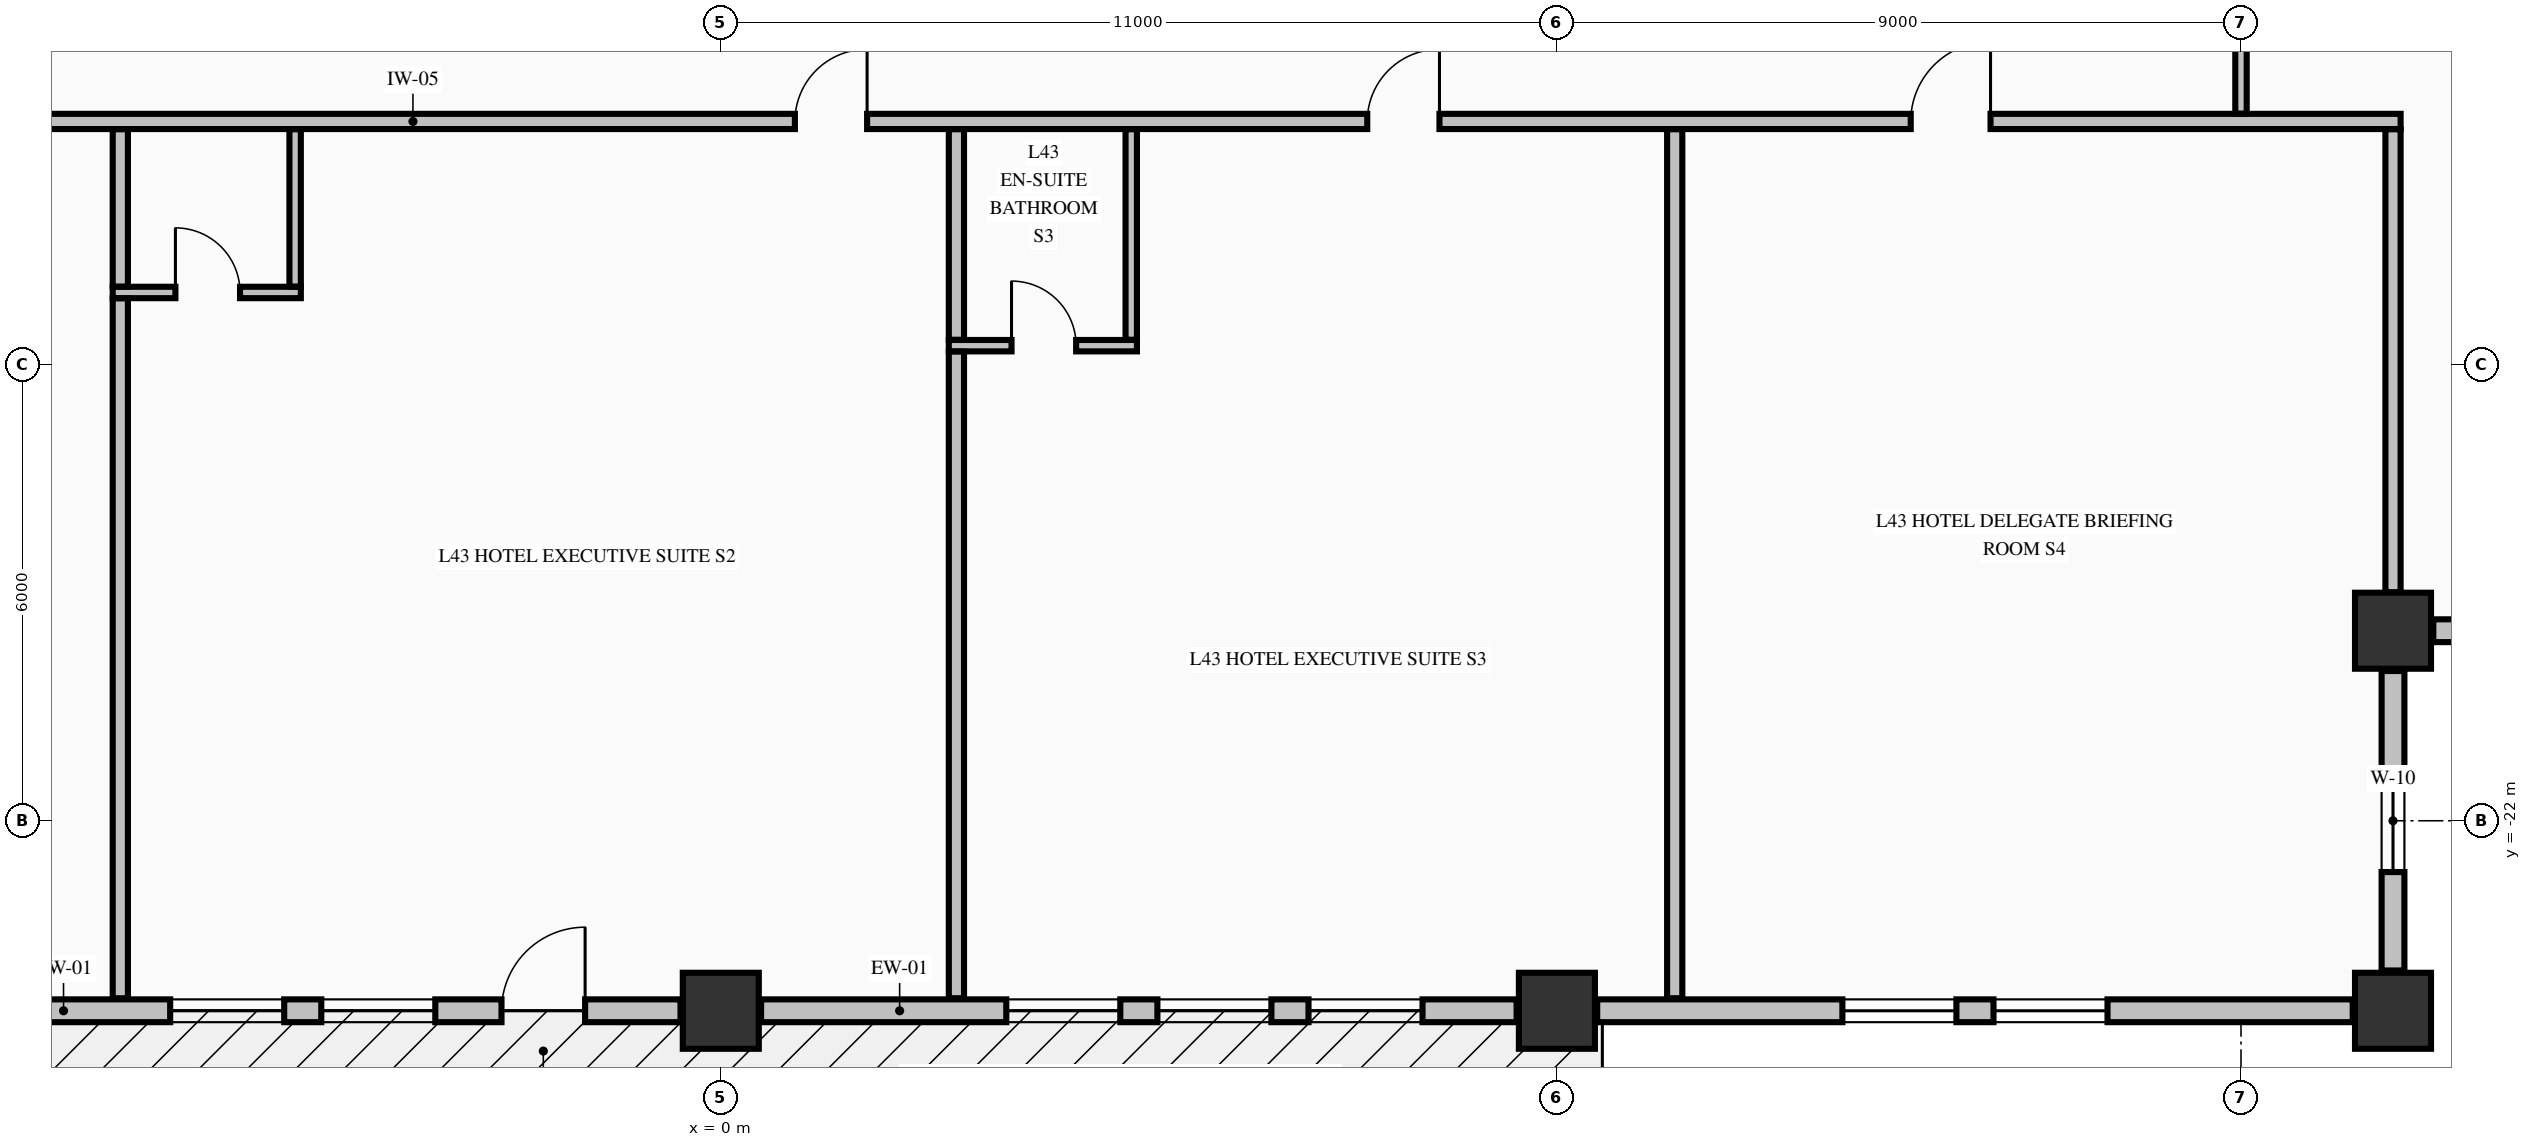
"""IFC4 building model, lengths in metres.
Left out: names, types, materials, properties, quantities, classifications, styles, units other than length and angle.
Written with IfcOpenShell. Run it as: python <this file> out.ifc"""

import sys

from ifc_helpers import new_model, si_unit, direction, frame, frame_2d, origin, origin_2d, place, context, subcontext, project, spatial, rectangle, extrude, element, fill, save


model = new_model("IFC4")
c1 = context("Model", 3, precision=1e-05, world=origin(), true_north=direction((0.0, 1.0)))
c2 = subcontext(c1, "Body", "Model", "MODEL_VIEW")
j1 = project(units=[si_unit("LENGTHUNIT", "METRE"), si_unit("PLANEANGLEUNIT", "RADIAN")], contexts=[c1])
p1 = place(None, origin())
s1 = spatial("IfcSite", under=j1, at=p1, CompositionType="ELEMENT")
p2 = place(p1, origin())
s2 = spatial("IfcBuilding", under=s1, at=p2, CompositionType="ELEMENT")
p3 = place(p2, frame((0.0, 0.0, 169.46)))
s3 = spatial("IfcBuildingStorey", under=s2, at=p3, CompositionType="ELEMENT", Elevation=169.46)
for number, where, z_axis, x_axis in (
    (1, (0.0, -24.5, -0.25), (0.0, 0.0, 1.0), (1.0, 0.0, 0.0)),
    (2, (11.0, -24.5, -0.25), (0.0, 0.0, 1.0), (1.0, 0.0, 0.0)),
    (3, (22.0, -24.5, -0.25), (0.0, 0.0, 1.0), (1.0, 0.0, 0.0)),
    (4, (22.0, -19.5, -0.25), (0.0, 0.0, 1.0), (1.0, 0.0, 0.0)),
):
    element("IfcColumn", number, at=place(p3, frame(where, z_axis=z_axis, x_axis=x_axis)), inside=s3, PredefinedType="COLUMN", context=c2, shape_type="SweptSolid", body=[
        extrude(rectangle(XDim=1.0, YDim=1.0, at=origin_2d()), origin(), (0.0, 0.0, 1.0), 3.4),
    ])
p4 = place(p3, frame((22.0, -23.97, 0.0), z_axis=(0.0, 0.0, 1.0), x_axis=(0.0, 1.0, 0.0)))
e5 = element("IfcWall", 5, at=p4, inside=s3, PredefinedType="STANDARD", context=c2, shape_type="SweptSolid", body=[
    extrude(rectangle(XDim=3.94, YDim=0.3, at=frame_2d((1.97, 0.0))), origin(), (0.0, 0.0, 1.0), 2.542),
])
p5 = place(p4, frame((1.295, 0.0, 0.68)))
e6 = element("IfcOpeningElement", 6, at=p5, cuts=e5, PredefinedType="OPENING", context=c2, shape_type="SweptSolid", body=[
    extrude(rectangle(XDim=1.35, YDim=1.42, at=frame_2d((0.675, 0.71))), frame((0.0, 0.16, 0.0), z_axis=(0.0, -1.0, 0.0), x_axis=(1.0, 0.0, 0.0)), (0.0, 0.0, 1.0), 0.32),
])
p6 = place(p3, frame((22.53, -19.5, 0.0), z_axis=(0.0, 0.0, 1.0), x_axis=(1.0, 0.0, 0.0)))
e7 = element("IfcWall", 7, at=p6, inside=s3, PredefinedType="STANDARD", context=c2, shape_type="SweptSolid", body=[
    extrude(rectangle(XDim=3.94, YDim=0.3, at=frame_2d((1.97, 0.0))), origin(), (0.0, 0.0, 1.0), 2.542),
])
p7 = place(p6, frame((1.295, 0.0, 0.68)))
e8 = element("IfcOpeningElement", 8, at=p7, cuts=e7, PredefinedType="OPENING", context=c2, shape_type="SweptSolid", body=[
    extrude(rectangle(XDim=1.35, YDim=1.42, at=frame_2d((0.675, 0.71))), frame((0.0, 0.16, 0.0), z_axis=(0.0, -1.0, 0.0), x_axis=(1.0, 0.0, 0.0)), (0.0, 0.0, 1.0), 0.32),
])
p8 = place(p3, frame((-10.47, -24.5, 0.0), z_axis=(0.0, 0.0, 1.0), x_axis=(1.0, 0.0, 0.0)))
e9 = element("IfcWall", 9, at=p8, inside=s3, PredefinedType="STANDARD", context=c2, shape_type="SweptSolid", body=[
    extrude(rectangle(XDim=9.94, YDim=0.3, at=frame_2d((4.97, 0.0))), origin(), (0.0, 0.0, 1.0), 2.542),
])
p9 = place(p8, frame((7.585, 0.0, 0.0)))
e10 = element("IfcOpeningElement", 10, at=p9, cuts=e9, PredefinedType="OPENING", context=c2, shape_type="SweptSolid", body=[
    extrude(rectangle(XDim=1.1, YDim=2.15, at=frame_2d((0.55, 1.075))), frame((0.0, 0.16, 0.0), z_axis=(0.0, -1.0, 0.0), x_axis=(1.0, 0.0, 0.0)), (0.0, 0.0, 1.0), 0.32),
])
p10 = place(p8, frame((3.226, 0.0, 0.72)))
e11 = element("IfcOpeningElement", 11, at=p10, cuts=e9, PredefinedType="OPENING", context=c2, shape_type="SweptSolid", body=[
    extrude(rectangle(XDim=1.5, YDim=1.6, at=frame_2d((0.75, 0.8))), frame((0.0, 0.16, 0.0), z_axis=(0.0, -1.0, 0.0), x_axis=(1.0, 0.0, 0.0)), (0.0, 0.0, 1.0), 0.32),
])
p11 = place(p8, frame((5.214, 0.0, 0.72)))
e12 = element("IfcOpeningElement", 12, at=p11, cuts=e9, PredefinedType="OPENING", context=c2, shape_type="SweptSolid", body=[
    extrude(rectangle(XDim=1.5, YDim=1.6, at=frame_2d((0.75, 0.8))), frame((0.0, 0.16, 0.0), z_axis=(0.0, -1.0, 0.0), x_axis=(1.0, 0.0, 0.0)), (0.0, 0.0, 1.0), 0.32),
])
p12 = place(p3, frame((0.53, -24.5, 0.0), z_axis=(0.0, 0.0, 1.0), x_axis=(1.0, 0.0, 0.0)))
e13 = element("IfcWall", 13, at=p12, inside=s3, PredefinedType="STANDARD", context=c2, shape_type="SweptSolid", body=[
    extrude(rectangle(XDim=9.94, YDim=0.3, at=frame_2d((4.97, 0.0))), origin(), (0.0, 0.0, 1.0), 2.542),
])
p13 = place(p12, frame((3.226, 0.0, 0.72)))
e14 = element("IfcOpeningElement", 14, at=p13, cuts=e13, PredefinedType="OPENING", context=c2, shape_type="SweptSolid", body=[
    extrude(rectangle(XDim=1.5, YDim=1.6, at=frame_2d((0.75, 0.8))), frame((0.0, 0.16, 0.0), z_axis=(0.0, -1.0, 0.0), x_axis=(1.0, 0.0, 0.0)), (0.0, 0.0, 1.0), 0.32),
])
p14 = place(p12, frame((5.214, 0.0, 0.72)))
e15 = element("IfcOpeningElement", 15, at=p14, cuts=e13, PredefinedType="OPENING", context=c2, shape_type="SweptSolid", body=[
    extrude(rectangle(XDim=1.5, YDim=1.6, at=frame_2d((0.75, 0.8))), frame((0.0, 0.16, 0.0), z_axis=(0.0, -1.0, 0.0), x_axis=(1.0, 0.0, 0.0)), (0.0, 0.0, 1.0), 0.32),
])
p15 = place(p12, frame((7.202, 0.0, 0.72)))
e16 = element("IfcOpeningElement", 16, at=p15, cuts=e13, PredefinedType="OPENING", context=c2, shape_type="SweptSolid", body=[
    extrude(rectangle(XDim=1.5, YDim=1.6, at=frame_2d((0.75, 0.8))), frame((0.0, 0.16, 0.0), z_axis=(0.0, -1.0, 0.0), x_axis=(1.0, 0.0, 0.0)), (0.0, 0.0, 1.0), 0.32),
])
p16 = place(p3, frame((11.53, -24.5, 0.0), z_axis=(0.0, 0.0, 1.0), x_axis=(1.0, 0.0, 0.0)))
e17 = element("IfcWall", 17, at=p16, inside=s3, PredefinedType="STANDARD", context=c2, shape_type="SweptSolid", body=[
    extrude(rectangle(XDim=9.94, YDim=0.3, at=frame_2d((4.97, 0.0))), origin(), (0.0, 0.0, 1.0), 2.542),
])
p17 = place(p16, frame((3.226, 0.0, 0.72)))
e18 = element("IfcOpeningElement", 18, at=p17, cuts=e17, PredefinedType="OPENING", context=c2, shape_type="SweptSolid", body=[
    extrude(rectangle(XDim=1.5, YDim=1.6, at=frame_2d((0.75, 0.8))), frame((0.0, 0.16, 0.0), z_axis=(0.0, -1.0, 0.0), x_axis=(1.0, 0.0, 0.0)), (0.0, 0.0, 1.0), 0.32),
])
p18 = place(p16, frame((5.214, 0.0, 0.72)))
e19 = element("IfcOpeningElement", 19, at=p18, cuts=e17, PredefinedType="OPENING", context=c2, shape_type="SweptSolid", body=[
    extrude(rectangle(XDim=1.5, YDim=1.6, at=frame_2d((0.75, 0.8))), frame((0.0, 0.16, 0.0), z_axis=(0.0, -1.0, 0.0), x_axis=(1.0, 0.0, 0.0)), (0.0, 0.0, 1.0), 0.32),
])
p19 = place(p3, frame((3.0, -15.75, 0.0), z_axis=(0.0, 0.0, 1.0), x_axis=(1.0, 0.0, 0.0)))
e20 = element("IfcWall", 20, at=p19, inside=s3, PredefinedType="PARTITIONING", context=c2, shape_type="SweptSolid", body=[
    extrude(rectangle(XDim=2.475, YDim=0.15, at=frame_2d((1.238, 0.0))), origin(), (0.0, 0.0, 1.0), 3.15),
])
p20 = place(p19, frame((0.825, 0.0, 0.0)))
e21 = element("IfcOpeningElement", 21, at=p20, cuts=e20, PredefinedType="OPENING", context=c2, shape_type="SweptSolid", body=[
    extrude(rectangle(XDim=0.85, YDim=2.1, at=frame_2d((0.425, 1.05))), frame((0.0, 0.085, 0.0), z_axis=(0.0, -1.0, 0.0), x_axis=(1.0, 0.0, 0.0)), (0.0, 0.0, 1.0), 0.17),
])
p21 = place(p3, frame((-8.0, -15.05, 0.0), z_axis=(0.0, 0.0, 1.0), x_axis=(1.0, 0.0, 0.0)))
e22 = element("IfcWall", 22, at=p21, inside=s3, PredefinedType="PARTITIONING", context=c2, shape_type="SweptSolid", body=[
    extrude(rectangle(XDim=2.475, YDim=0.15, at=frame_2d((1.238, 0.0))), origin(), (0.0, 0.0, 1.0), 3.15),
])
p22 = place(p21, frame((0.825, 0.0, 0.0)))
e23 = element("IfcOpeningElement", 23, at=p22, cuts=e22, PredefinedType="OPENING", context=c2, shape_type="SweptSolid", body=[
    extrude(rectangle(XDim=0.85, YDim=2.1, at=frame_2d((0.425, 1.05))), frame((0.0, 0.085, 0.0), z_axis=(0.0, -1.0, 0.0), x_axis=(1.0, 0.0, 0.0)), (0.0, 0.0, 1.0), 0.17),
])
p23 = place(p3, frame((-17.1, -12.8, 0.0), z_axis=(0.0, 0.0, 1.0), x_axis=(1.0, 0.0, 0.0)))
e24 = element("IfcWall", 24, at=p23, inside=s3, PredefinedType="PARTITIONING", context=c2, shape_type="SweptSolid", body=[
    extrude(rectangle(XDim=39.2, YDim=0.2, at=frame_2d((19.6, 0.0))), origin(), (0.0, 0.0, 1.0), 3.15),
])
p24 = place(p23, frame((7.075, 0.0, 0.0)))
e25 = element("IfcOpeningElement", 25, at=p24, cuts=e24, PredefinedType="OPENING", context=c2, shape_type="SweptSolid", body=[
    extrude(rectangle(XDim=0.95, YDim=2.15, at=frame_2d((0.475, 1.075))), frame((0.0, 0.11, 0.0), z_axis=(0.0, -1.0, 0.0), x_axis=(1.0, 0.0, 0.0)), (0.0, 0.0, 1.0), 0.22),
])
p25 = place(p23, frame((18.075, 0.0, 0.0)))
e26 = element("IfcOpeningElement", 26, at=p25, cuts=e24, PredefinedType="OPENING", context=c2, shape_type="SweptSolid", body=[
    extrude(rectangle(XDim=0.95, YDim=2.15, at=frame_2d((0.475, 1.075))), frame((0.0, 0.11, 0.0), z_axis=(0.0, -1.0, 0.0), x_axis=(1.0, 0.0, 0.0)), (0.0, 0.0, 1.0), 0.22),
])
p26 = place(p23, frame((25.605, 0.0, 0.0)))
e27 = element("IfcOpeningElement", 27, at=p26, cuts=e24, PredefinedType="OPENING", context=c2, shape_type="SweptSolid", body=[
    extrude(rectangle(XDim=0.95, YDim=2.15, at=frame_2d((0.475, 1.075))), frame((0.0, 0.11, 0.0), z_axis=(0.0, -1.0, 0.0), x_axis=(1.0, 0.0, 0.0)), (0.0, 0.0, 1.0), 0.22),
])
p27 = place(p23, frame((32.755, 0.0, 0.0)))
e28 = element("IfcOpeningElement", 28, at=p27, cuts=e24, PredefinedType="OPENING", context=c2, shape_type="SweptSolid", body=[
    extrude(rectangle(XDim=1.05, YDim=2.15, at=frame_2d((0.525, 1.075))), frame((0.0, 0.11, 0.0), z_axis=(0.0, -1.0, 0.0), x_axis=(1.0, 0.0, 0.0)), (0.0, 0.0, 1.0), 0.22),
])
p28 = place(p3, frame((-7.9, -24.335, 0.0), z_axis=(0.0, 0.0, 1.0), x_axis=(0.0, 1.0, 0.0)))
e29 = element("IfcWall", 29, at=p28, inside=s3, PredefinedType="PARTITIONING", context=c2, shape_type="SweptSolid", body=[
    extrude(rectangle(XDim=9.207, YDim=0.2, at=frame_2d((4.604, 0.0))), origin(), (0.0, 0.0, 1.0), 3.15),
])
p29 = place(p3, frame((-7.9, -14.972, 0.0), z_axis=(0.0, 0.0, 1.0), x_axis=(0.0, 1.0, 0.0)))
e30 = element("IfcWall", 30, at=p29, inside=s3, PredefinedType="PARTITIONING", context=c2, shape_type="SweptSolid", body=[
    extrude(rectangle(XDim=2.069, YDim=0.2, at=frame_2d((1.034, 0.0))), origin(), (0.0, 0.0, 1.0), 3.15),
])
p30 = place(p3, frame((-5.6, -14.972, 0.0), z_axis=(0.0, 0.0, 1.0), x_axis=(0.0, 1.0, 0.0)))
e31 = element("IfcWall", 31, at=p30, inside=s3, PredefinedType="PARTITIONING", context=c2, shape_type="SweptSolid", body=[
    extrude(rectangle(XDim=2.069, YDim=0.15, at=frame_2d((1.034, 0.0))), origin(), (0.0, 0.0, 1.0), 3.15),
])
p31 = place(p3, frame((3.1, -24.335, 0.0), z_axis=(0.0, 0.0, 1.0), x_axis=(0.0, 1.0, 0.0)))
e32 = element("IfcWall", 32, at=p31, inside=s3, PredefinedType="PARTITIONING", context=c2, shape_type="SweptSolid", body=[
    extrude(rectangle(XDim=8.507, YDim=0.2, at=frame_2d((4.253, 0.0))), origin(), (0.0, 0.0, 1.0), 3.15),
])
p32 = place(p3, frame((3.1, -15.672, 0.0), z_axis=(0.0, 0.0, 1.0), x_axis=(0.0, 1.0, 0.0)))
e33 = element("IfcWall", 33, at=p32, inside=s3, PredefinedType="PARTITIONING", context=c2, shape_type="SweptSolid", body=[
    extrude(rectangle(XDim=2.769, YDim=0.2, at=frame_2d((1.385, 0.0))), origin(), (0.0, 0.0, 1.0), 3.15),
])
p33 = place(p3, frame((5.4, -15.672, 0.0), z_axis=(0.0, 0.0, 1.0), x_axis=(0.0, 1.0, 0.0)))
e34 = element("IfcWall", 34, at=p33, inside=s3, PredefinedType="PARTITIONING", context=c2, shape_type="SweptSolid", body=[
    extrude(rectangle(XDim=2.769, YDim=0.15, at=frame_2d((1.385, 0.0))), origin(), (0.0, 0.0, 1.0), 3.15),
])
p34 = place(p3, frame((12.55, -24.335, 0.0), z_axis=(0.0, 0.0, 1.0), x_axis=(0.0, 1.0, 0.0)))
e35 = element("IfcWall", 35, at=p34, inside=s3, PredefinedType="PARTITIONING", context=c2, shape_type="SweptSolid", body=[
    extrude(rectangle(XDim=11.432, YDim=0.2, at=frame_2d((5.716, 0.0))), origin(), (0.0, 0.0, 1.0), 3.15),
])
p35 = place(p3, frame((20.0, -12.697, 0.0), z_axis=(0.0, 0.0, 1.0), x_axis=(0.0, 1.0, 0.0)))
e36 = element("IfcWall", 36, at=p35, inside=s3, PredefinedType="PARTITIONING", context=c2, shape_type="SweptSolid", body=[
    extrude(rectangle(XDim=2.316, YDim=0.15, at=frame_2d((1.158, 0.0))), origin(), (0.0, 0.0, 1.0), 2.342),
])
p36 = place(p3, frame((22.0, -18.994, 0.0), z_axis=(0.0, 0.0, 1.0), x_axis=(0.0, 1.0, 0.0)))
e37 = element("IfcWall", 37, at=p36, inside=s3, PredefinedType="PARTITIONING", context=c2, shape_type="SweptSolid", body=[
    extrude(rectangle(XDim=6.091, YDim=0.2, at=frame_2d((3.045, 0.0))), origin(), (0.0, 0.0, 1.0), 3.15),
])
p37 = place(p5, origin())
e38 = element("IfcWindow", 38, at=p37, inside=s3, PartitioningType="SINGLE_PANEL", PredefinedType="WINDOW", context=c2, shape_type="SweptSolid", body=[
    extrude(rectangle(XDim=1.35, YDim=1.42, at=frame_2d((0.675, 0.71))), frame((0.0, 0.03, 0.0), z_axis=(0.0, -1.0, 0.0), x_axis=(1.0, 0.0, 0.0)), (0.0, 0.0, 1.0), 0.06),
])
fill(e6, e38)
p38 = place(p9, origin())
e39 = element("IfcDoor", 39, at=p38, inside=s3, OperationType="SINGLE_SWING_RIGHT", PredefinedType="DOOR", context=c2, shape_type="SweptSolid", body=[
    extrude(rectangle(XDim=1.1, YDim=2.15, at=frame_2d((0.55, 1.075))), frame((0.0, 0.025, 0.0), z_axis=(0.0, -1.0, 0.0), x_axis=(1.0, 0.0, 0.0)), (0.0, 0.0, 1.0), 0.05),
])
fill(e10, e39)
p39 = place(p10, origin())
e40 = element("IfcWindow", 40, at=p39, inside=s3, PartitioningType="SINGLE_PANEL", PredefinedType="WINDOW", context=c2, shape_type="SweptSolid", body=[
    extrude(rectangle(XDim=1.5, YDim=1.6, at=frame_2d((0.75, 0.8))), frame((0.0, 0.03, 0.0), z_axis=(0.0, -1.0, 0.0), x_axis=(1.0, 0.0, 0.0)), (0.0, 0.0, 1.0), 0.06),
])
fill(e11, e40)
p40 = place(p11, origin())
e41 = element("IfcWindow", 41, at=p40, inside=s3, PartitioningType="SINGLE_PANEL", PredefinedType="WINDOW", context=c2, shape_type="SweptSolid", body=[
    extrude(rectangle(XDim=1.5, YDim=1.6, at=frame_2d((0.75, 0.8))), frame((0.0, 0.03, 0.0), z_axis=(0.0, -1.0, 0.0), x_axis=(1.0, 0.0, 0.0)), (0.0, 0.0, 1.0), 0.06),
])
fill(e12, e41)
p41 = place(p13, origin())
e42 = element("IfcWindow", 42, at=p41, inside=s3, PartitioningType="SINGLE_PANEL", PredefinedType="WINDOW", context=c2, shape_type="SweptSolid", body=[
    extrude(rectangle(XDim=1.5, YDim=1.6, at=frame_2d((0.75, 0.8))), frame((0.0, 0.03, 0.0), z_axis=(0.0, -1.0, 0.0), x_axis=(1.0, 0.0, 0.0)), (0.0, 0.0, 1.0), 0.06),
])
fill(e14, e42)
p42 = place(p14, origin())
e43 = element("IfcWindow", 43, at=p42, inside=s3, PartitioningType="SINGLE_PANEL", PredefinedType="WINDOW", context=c2, shape_type="SweptSolid", body=[
    extrude(rectangle(XDim=1.5, YDim=1.6, at=frame_2d((0.75, 0.8))), frame((0.0, 0.03, 0.0), z_axis=(0.0, -1.0, 0.0), x_axis=(1.0, 0.0, 0.0)), (0.0, 0.0, 1.0), 0.06),
])
fill(e15, e43)
p43 = place(p15, origin())
e44 = element("IfcWindow", 44, at=p43, inside=s3, PartitioningType="SINGLE_PANEL", PredefinedType="WINDOW", context=c2, shape_type="SweptSolid", body=[
    extrude(rectangle(XDim=1.5, YDim=1.6, at=frame_2d((0.75, 0.8))), frame((0.0, 0.03, 0.0), z_axis=(0.0, -1.0, 0.0), x_axis=(1.0, 0.0, 0.0)), (0.0, 0.0, 1.0), 0.06),
])
fill(e16, e44)
p44 = place(p17, origin())
e45 = element("IfcWindow", 45, at=p44, inside=s3, PartitioningType="SINGLE_PANEL", PredefinedType="WINDOW", context=c2, shape_type="SweptSolid", body=[
    extrude(rectangle(XDim=1.5, YDim=1.6, at=frame_2d((0.75, 0.8))), frame((0.0, 0.03, 0.0), z_axis=(0.0, -1.0, 0.0), x_axis=(1.0, 0.0, 0.0)), (0.0, 0.0, 1.0), 0.06),
])
fill(e18, e45)
p45 = place(p18, origin())
e46 = element("IfcWindow", 46, at=p45, inside=s3, PartitioningType="SINGLE_PANEL", PredefinedType="WINDOW", context=c2, shape_type="SweptSolid", body=[
    extrude(rectangle(XDim=1.5, YDim=1.6, at=frame_2d((0.75, 0.8))), frame((0.0, 0.03, 0.0), z_axis=(0.0, -1.0, 0.0), x_axis=(1.0, 0.0, 0.0)), (0.0, 0.0, 1.0), 0.06),
])
fill(e19, e46)
p46 = place(p25, origin())
e47 = element("IfcDoor", 47, at=p46, inside=s3, OperationType="SINGLE_SWING_RIGHT", PredefinedType="DOOR", context=c2, shape_type="SweptSolid", body=[
    extrude(rectangle(XDim=0.95, YDim=2.15, at=frame_2d((0.475, 1.075))), frame((0.0, 0.025, 0.0), z_axis=(0.0, -1.0, 0.0), x_axis=(1.0, 0.0, 0.0)), (0.0, 0.0, 1.0), 0.05),
])
fill(e26, e47)
p47 = place(p22, origin())
e48 = element("IfcDoor", 48, at=p47, inside=s3, OperationType="SINGLE_SWING_LEFT", PredefinedType="DOOR", context=c2, shape_type="SweptSolid", body=[
    extrude(rectangle(XDim=0.85, YDim=2.1, at=frame_2d((0.425, 1.05))), frame((0.0, 0.025, 0.0), z_axis=(0.0, -1.0, 0.0), x_axis=(1.0, 0.0, 0.0)), (0.0, 0.0, 1.0), 0.05),
])
fill(e23, e48)
p48 = place(p26, origin())
e49 = element("IfcDoor", 49, at=p48, inside=s3, OperationType="SINGLE_SWING_RIGHT", PredefinedType="DOOR", context=c2, shape_type="SweptSolid", body=[
    extrude(rectangle(XDim=0.95, YDim=2.15, at=frame_2d((0.475, 1.075))), frame((0.0, 0.025, 0.0), z_axis=(0.0, -1.0, 0.0), x_axis=(1.0, 0.0, 0.0)), (0.0, 0.0, 1.0), 0.05),
])
fill(e27, e49)
p49 = place(p20, origin())
e50 = element("IfcDoor", 50, at=p49, inside=s3, OperationType="SINGLE_SWING_LEFT", PredefinedType="DOOR", context=c2, shape_type="SweptSolid", body=[
    extrude(rectangle(XDim=0.85, YDim=2.1, at=frame_2d((0.425, 1.05))), frame((0.0, 0.025, 0.0), z_axis=(0.0, -1.0, 0.0), x_axis=(1.0, 0.0, 0.0)), (0.0, 0.0, 1.0), 0.05),
])
fill(e21, e50)
p50 = place(p27, origin())
e51 = element("IfcDoor", 51, at=p50, inside=s3, OperationType="SINGLE_SWING_RIGHT", PredefinedType="DOOR", context=c2, shape_type="SweptSolid", body=[
    extrude(rectangle(XDim=1.05, YDim=2.15, at=frame_2d((0.525, 1.075))), frame((0.0, 0.025, 0.0), z_axis=(0.0, -1.0, 0.0), x_axis=(1.0, 0.0, 0.0)), (0.0, 0.0, 1.0), 0.05),
])
fill(e28, e51)
save(model, sys.argv[1])
